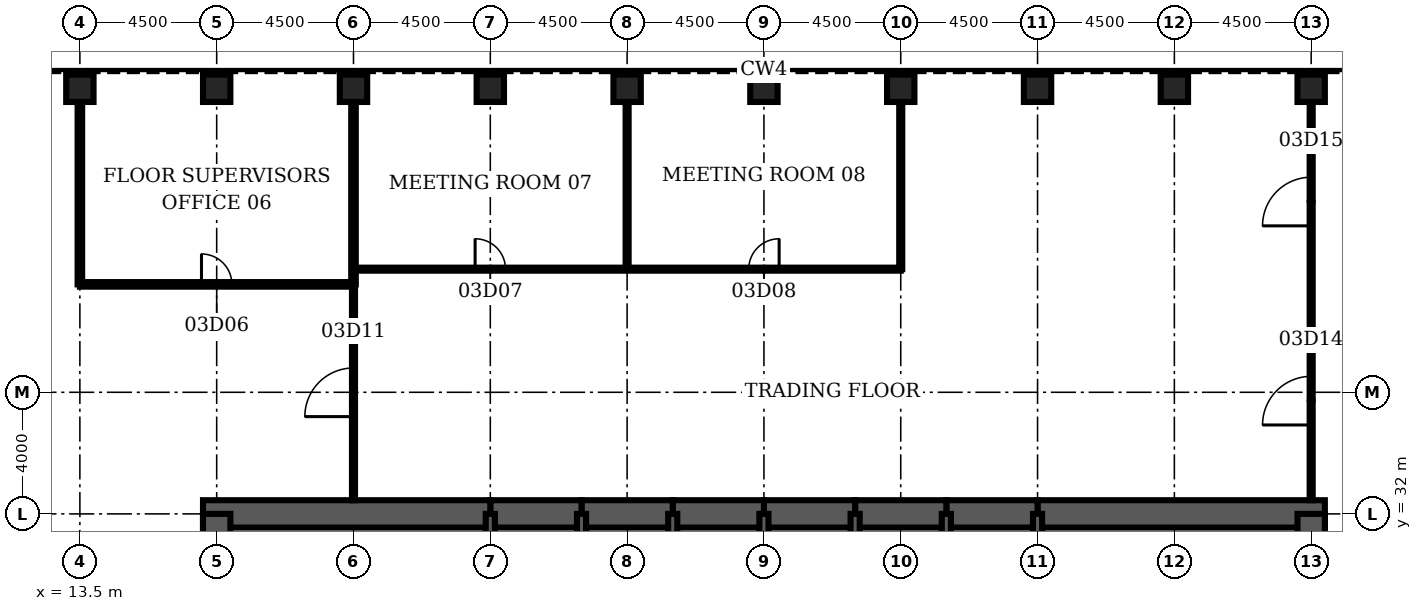
"""IFC4 building model, lengths in metres.
Left out: names, types, materials, properties, quantities, classifications, styles, units other than length and angle.
Written with IfcOpenShell. Run it as: python <this file> out.ifc"""

import sys

from ifc_helpers import new_model, si_unit, direction, frame, frame_2d, origin, origin_2d, place, context, subcontext, project, spatial, rectangle, hollow_rectangle, extrude, element, fill, save


model = new_model("IFC4")
c1 = context("Model", 3, precision=1e-05, world=origin(), true_north=direction((0.0, 1.0)))
c2 = subcontext(c1, "Body", "Model", "MODEL_VIEW")
j1 = project(units=[si_unit("LENGTHUNIT", "METRE"), si_unit("PLANEANGLEUNIT", "RADIAN")], contexts=[c1])
p1 = place(None, origin())
s1 = spatial("IfcSite", under=j1, at=p1, CompositionType="ELEMENT")
p2 = place(p1, origin())
s2 = spatial("IfcBuilding", under=s1, at=p2, CompositionType="ELEMENT")
p3 = place(p2, frame((0.0, 0.0, 18.0)))
s3 = spatial("IfcBuildingStorey", under=s2, at=p3, CompositionType="ELEMENT", Elevation=18.0)
for number, where, z_axis, x_axis in (
    (1, (54.0, 46.0, 0.0), (0.0, 0.0, 1.0), (0.0, 1.0, 0.0)),
    (2, (49.5, 46.0, 0.0), (0.0, 0.0, 1.0), (0.0, 1.0, 0.0)),
    (3, (45.0, 46.0, 0.0), (0.0, 0.0, 1.0), (0.0, 1.0, 0.0)),
    (4, (40.5, 46.0, 0.0), (0.0, 0.0, 1.0), (0.0, 1.0, 0.0)),
    (5, (36.0, 46.0, 0.0), (0.0, 0.0, 1.0), (0.0, 1.0, 0.0)),
    (6, (31.5, 46.0, 0.0), (0.0, 0.0, 1.0), (0.0, 1.0, 0.0)),
    (7, (27.0, 46.0, 0.0), (0.0, 0.0, 1.0), (0.0, 1.0, 0.0)),
    (8, (22.5, 46.0, 0.0), (0.0, 0.0, 1.0), (0.0, 1.0, 0.0)),
    (9, (18.0, 46.0, 0.0), (0.0, 0.0, 1.0), (0.0, 1.0, 0.0)),
    (10, (13.5, 46.0, 0.0), (0.0, 0.0, 1.0), (0.0, 1.0, 0.0)),
):
    element("IfcColumn", number, at=place(p3, frame(where, z_axis=z_axis, x_axis=x_axis)), inside=s3, PredefinedType="COLUMN", context=c2, shape_type="SweptSolid", body=[
        extrude(hollow_rectangle(XDim=0.9, YDim=0.9, WallThickness=0.12, at=origin_2d()), origin(), (0.0, 0.0, 1.0), 5.0),
    ])
p4 = place(p3, frame((54.45, 32.0, 0.0), z_axis=(0.0, 0.0, 1.0), x_axis=(-1.0, 0.0, 0.0)))
e11 = element("IfcWall", 11, at=p4, inside=s3, PredefinedType="SHEAR", context=c2, shape_type="SweptSolid", body=[
    extrude(rectangle(XDim=9.45, YDim=0.9, at=frame_2d((4.725, 0.0))), origin(), (0.0, 0.0, 1.0), 5.0),
])
for number, where, z_axis, x_axis in (
    (12, (45.0, 32.0, 0.0), (0.0, 0.0, 1.0), (-1.0, 0.0, 0.0)),
    (13, (42.0, 32.0, 0.0), (0.0, 0.0, 1.0), (-1.0, 0.0, 0.0)),
    (14, (39.0, 32.0, 0.0), (0.0, 0.0, 1.0), (-1.0, 0.0, 0.0)),
    (15, (36.0, 32.0, 0.0), (0.0, 0.0, 1.0), (-1.0, 0.0, 0.0)),
    (16, (33.0, 32.0, 0.0), (0.0, 0.0, 1.0), (-1.0, 0.0, 0.0)),
    (17, (30.0, 32.0, 0.0), (0.0, 0.0, 1.0), (-1.0, 0.0, 0.0)),
):
    element("IfcWall", number, at=place(p3, frame(where, z_axis=z_axis, x_axis=x_axis)), inside=s3, PredefinedType="SHEAR", context=c2, shape_type="SweptSolid", body=[
        extrude(rectangle(XDim=3.0, YDim=0.9, at=frame_2d((1.5, 0.0))), origin(), (0.0, 0.0, 1.0), 5.0),
    ])
p5 = place(p3, frame((27.0, 32.0, 0.0), z_axis=(0.0, 0.0, 1.0), x_axis=(-1.0, 0.0, 0.0)))
e18 = element("IfcWall", 18, at=p5, inside=s3, PredefinedType="SHEAR", context=c2, shape_type="SweptSolid", body=[
    extrude(rectangle(XDim=9.45, YDim=0.9, at=frame_2d((4.725, 0.0))), origin(), (0.0, 0.0, 1.0), 5.0),
])
for number, where, z_axis, x_axis in (
    (19, (18.0, 32.0, 0.0), (0.0, 0.0, 1.0), (0.0, -1.0, 0.0)),
    (20, (54.0, 28.8, 0.0), (0.0, 0.0, 1.0), (0.0, 1.0, 0.0)),
):
    element("IfcWall", number, at=place(p3, frame(where, z_axis=z_axis, x_axis=x_axis)), inside=s3, PredefinedType="SHEAR", context=c2, shape_type="SweptSolid", body=[
        extrude(rectangle(XDim=3.2, YDim=0.9, at=frame_2d((1.6, 0.0))), origin(), (0.0, 0.0, 1.0), 5.0),
    ])
for number, where, z_axis, x_axis in (
    (21, (27.0, 28.8, 0.0), (0.0, 0.0, 1.0), (0.0, 1.0, 0.0)),
    (22, (30.0, 28.8, 0.0), (0.0, 0.0, 1.0), (0.0, 1.0, 0.0)),
    (23, (33.0, 28.8, 0.0), (0.0, 0.0, 1.0), (0.0, 1.0, 0.0)),
    (24, (36.0, 28.8, 0.0), (0.0, 0.0, 1.0), (0.0, 1.0, 0.0)),
    (25, (39.0, 28.8, 0.0), (0.0, 0.0, 1.0), (0.0, 1.0, 0.0)),
    (26, (42.0, 28.8, 0.0), (0.0, 0.0, 1.0), (0.0, 1.0, 0.0)),
    (27, (45.0, 28.8, 0.0), (0.0, 0.0, 1.0), (0.0, 1.0, 0.0)),
):
    element("IfcWall", number, at=place(p3, frame(where, z_axis=z_axis, x_axis=x_axis)), inside=s3, PredefinedType="SOLIDWALL", context=c2, shape_type="SweptSolid", body=[
        extrude(rectangle(XDim=3.2, YDim=0.3, at=frame_2d((1.6, 0.0))), origin(), (0.0, 0.0, 1.0), 5.0),
    ])
p6 = place(p3, frame((13.5, 39.55, 0.0), z_axis=(0.0, 0.0, 1.0), x_axis=(1.0, 0.0, 0.0)))
e28 = element("IfcWall", 28, at=p6, inside=s3, PredefinedType="PARTITIONING", context=c2, shape_type="SweptSolid", body=[
    extrude(rectangle(XDim=9.0, YDim=0.15, at=frame_2d((4.5, 0.0))), origin(), (0.0, 0.0, 1.0), 3.0),
])
p7 = place(p6, frame((4.0, 0.0, 0.0)))
e29 = element("IfcOpeningElement", 29, at=p7, cuts=e28, PredefinedType="OPENING", context=c2, shape_type="SweptSolid", body=[
    extrude(rectangle(XDim=1.0, YDim=2.1, at=frame_2d((0.5, 1.05))), frame((0.0, 0.085, 0.0), z_axis=(0.0, -1.0, 0.0), x_axis=(1.0, 0.0, 0.0)), (0.0, 0.0, 1.0), 0.17),
])
p8 = place(p3, frame((22.5, 40.05, 0.0), z_axis=(0.0, 0.0, 1.0), x_axis=(1.0, 0.0, 0.0)))
e30 = element("IfcWall", 30, at=p8, inside=s3, PredefinedType="PARTITIONING", context=c2, shape_type="SweptSolid", body=[
    extrude(rectangle(XDim=18.0, YDim=0.1, at=frame_2d((9.0, 0.0))), origin(), (0.0, 0.0, 1.0), 3.0),
])
p9 = place(p8, frame((4.0, 0.0, 0.0)))
e31 = element("IfcOpeningElement", 31, at=p9, cuts=e30, PredefinedType="OPENING", context=c2, shape_type="SweptSolid", body=[
    extrude(rectangle(XDim=1.0, YDim=2.1, at=frame_2d((0.5, 1.05))), frame((0.0, 0.06, 0.0), z_axis=(0.0, -1.0, 0.0), x_axis=(1.0, 0.0, 0.0)), (0.0, 0.0, 1.0), 0.12),
])
p10 = place(p8, frame((13.0, 0.0, 0.0)))
e32 = element("IfcOpeningElement", 32, at=p10, cuts=e30, PredefinedType="OPENING", context=c2, shape_type="SweptSolid", body=[
    extrude(rectangle(XDim=1.0, YDim=2.1, at=frame_2d((0.5, 1.05))), frame((0.0, 0.06, 0.0), z_axis=(0.0, -1.0, 0.0), x_axis=(1.0, 0.0, 0.0)), (0.0, 0.0, 1.0), 0.12),
])
p11 = place(p3, frame((13.5, 39.55, 0.0), z_axis=(0.0, 0.0, 1.0), x_axis=(0.0, 1.0, 0.0)))
e33 = element("IfcWall", 33, at=p11, inside=s3, PredefinedType="PARTITIONING", context=c2, shape_type="SweptSolid", body=[
    extrude(rectangle(XDim=6.0, YDim=0.15, at=frame_2d((3.0, 0.0))), origin(), (0.0, 0.0, 1.0), 3.0),
])
p12 = place(p3, frame((22.5, 32.45, 0.0), z_axis=(0.0, 0.0, 1.0), x_axis=(0.0, 1.0, 0.0)))
e34 = element("IfcWall", 34, at=p12, inside=s3, PredefinedType="PARTITIONING", context=c2, shape_type="SweptSolid", body=[
    extrude(rectangle(XDim=7.1, YDim=0.1, at=frame_2d((3.55, 0.0))), origin(), (0.0, 0.0, 1.0), 3.0),
])
p13 = place(p12, frame((2.75, 0.0, 0.0)))
e35 = element("IfcOpeningElement", 35, at=p13, cuts=e34, PredefinedType="OPENING", context=c2, shape_type="SweptSolid", body=[
    extrude(rectangle(XDim=1.6, YDim=2.1, at=frame_2d((0.8, 1.05))), frame((0.0, 0.06, 0.0), z_axis=(0.0, -1.0, 0.0), x_axis=(1.0, 0.0, 0.0)), (0.0, 0.0, 1.0), 0.12),
])
p14 = place(p3, frame((22.5, 39.55, 0.0), z_axis=(0.0, 0.0, 1.0), x_axis=(0.0, 1.0, 0.0)))
e36 = element("IfcWall", 36, at=p14, inside=s3, PredefinedType="PARTITIONING", context=c2, shape_type="SweptSolid", body=[
    extrude(rectangle(XDim=6.0, YDim=0.15, at=frame_2d((3.0, 0.0))), origin(), (0.0, 0.0, 1.0), 3.0),
])
for number, where, z_axis, x_axis in (
    (37, (31.5, 40.05, 0.0), (0.0, 0.0, 1.0), (0.0, 1.0, 0.0)),
    (38, (40.5, 40.05, 0.0), (0.0, 0.0, 1.0), (0.0, 1.0, 0.0)),
):
    element("IfcWall", number, at=place(p3, frame(where, z_axis=z_axis, x_axis=x_axis)), inside=s3, PredefinedType="PARTITIONING", context=c2, shape_type="SweptSolid", body=[
        extrude(rectangle(XDim=5.5, YDim=0.1, at=frame_2d((2.75, 0.0))), origin(), (0.0, 0.0, 1.0), 3.0),
    ])
p15 = place(p3, frame((54.0, 32.45, 0.0), z_axis=(0.0, 0.0, 1.0), x_axis=(0.0, 1.0, 0.0)))
e39 = element("IfcWall", 39, at=p15, inside=s3, PredefinedType="PARTITIONING", context=c2, shape_type="SweptSolid", body=[
    extrude(rectangle(XDim=13.1, YDim=0.1, at=frame_2d((6.55, 0.0))), origin(), (0.0, 0.0, 1.0), 3.0),
])
p16 = place(p15, frame((2.475, 0.0, 0.0)))
e40 = element("IfcOpeningElement", 40, at=p16, cuts=e39, PredefinedType="OPENING", context=c2, shape_type="SweptSolid", body=[
    extrude(rectangle(XDim=1.6, YDim=2.1, at=frame_2d((0.8, 1.05))), frame((0.0, 0.06, 0.0), z_axis=(0.0, -1.0, 0.0), x_axis=(1.0, 0.0, 0.0)), (0.0, 0.0, 1.0), 0.12),
])
p17 = place(p15, frame((9.025, 0.0, 0.0)))
e41 = element("IfcOpeningElement", 41, at=p17, cuts=e39, PredefinedType="OPENING", context=c2, shape_type="SweptSolid", body=[
    extrude(rectangle(XDim=1.6, YDim=2.1, at=frame_2d((0.8, 1.05))), frame((0.0, 0.06, 0.0), z_axis=(0.0, -1.0, 0.0), x_axis=(1.0, 0.0, 0.0)), (0.0, 0.0, 1.0), 0.12),
])
p18 = place(p7, origin())
e42 = element("IfcDoor", 42, at=p18, inside=s3, OperationType="SINGLE_SWING_LEFT", PredefinedType="DOOR", context=c2, shape_type="SweptSolid", body=[
    extrude(rectangle(XDim=1.0, YDim=2.1, at=frame_2d((0.5, 1.05))), frame((0.0, 0.025, 0.0), z_axis=(0.0, -1.0, 0.0), x_axis=(1.0, 0.0, 0.0)), (0.0, 0.0, 1.0), 0.05),
])
fill(e29, e42)
p19 = place(p9, origin())
e43 = element("IfcDoor", 43, at=p19, inside=s3, OperationType="SINGLE_SWING_LEFT", PredefinedType="DOOR", context=c2, shape_type="SweptSolid", body=[
    extrude(rectangle(XDim=1.0, YDim=2.1, at=frame_2d((0.5, 1.05))), frame((0.0, 0.025, 0.0), z_axis=(0.0, -1.0, 0.0), x_axis=(1.0, 0.0, 0.0)), (0.0, 0.0, 1.0), 0.05),
])
fill(e31, e43)
p20 = place(p10, origin())
e44 = element("IfcDoor", 44, at=p20, inside=s3, OperationType="SINGLE_SWING_RIGHT", PredefinedType="DOOR", context=c2, shape_type="SweptSolid", body=[
    extrude(rectangle(XDim=1.0, YDim=2.1, at=frame_2d((0.5, 1.05))), frame((0.0, 0.025, 0.0), z_axis=(0.0, -1.0, 0.0), x_axis=(1.0, 0.0, 0.0)), (0.0, 0.0, 1.0), 0.05),
])
fill(e32, e44)
p21 = place(p13, origin())
e45 = element("IfcDoor", 45, at=p21, inside=s3, OperationType="SINGLE_SWING_LEFT", PredefinedType="DOOR", context=c2, shape_type="SweptSolid", body=[
    extrude(rectangle(XDim=1.6, YDim=2.1, at=frame_2d((0.8, 1.05))), frame((0.0, 0.025, 0.0), z_axis=(0.0, -1.0, 0.0), x_axis=(1.0, 0.0, 0.0)), (0.0, 0.0, 1.0), 0.05),
])
fill(e35, e45)
p22 = place(p16, origin())
e46 = element("IfcDoor", 46, at=p22, inside=s3, OperationType="SINGLE_SWING_LEFT", PredefinedType="DOOR", context=c2, shape_type="SweptSolid", body=[
    extrude(rectangle(XDim=1.6, YDim=2.1, at=frame_2d((0.8, 1.05))), frame((0.0, 0.025, 0.0), z_axis=(0.0, -1.0, 0.0), x_axis=(1.0, 0.0, 0.0)), (0.0, 0.0, 1.0), 0.05),
])
fill(e40, e46)
p23 = place(p17, origin())
e47 = element("IfcDoor", 47, at=p23, inside=s3, OperationType="SINGLE_SWING_LEFT", PredefinedType="DOOR", context=c2, shape_type="SweptSolid", body=[
    extrude(rectangle(XDim=1.6, YDim=2.1, at=frame_2d((0.8, 1.05))), frame((0.0, 0.025, 0.0), z_axis=(0.0, -1.0, 0.0), x_axis=(1.0, 0.0, 0.0)), (0.0, 0.0, 1.0), 0.05),
])
fill(e41, e47)
save(model, sys.argv[1])
